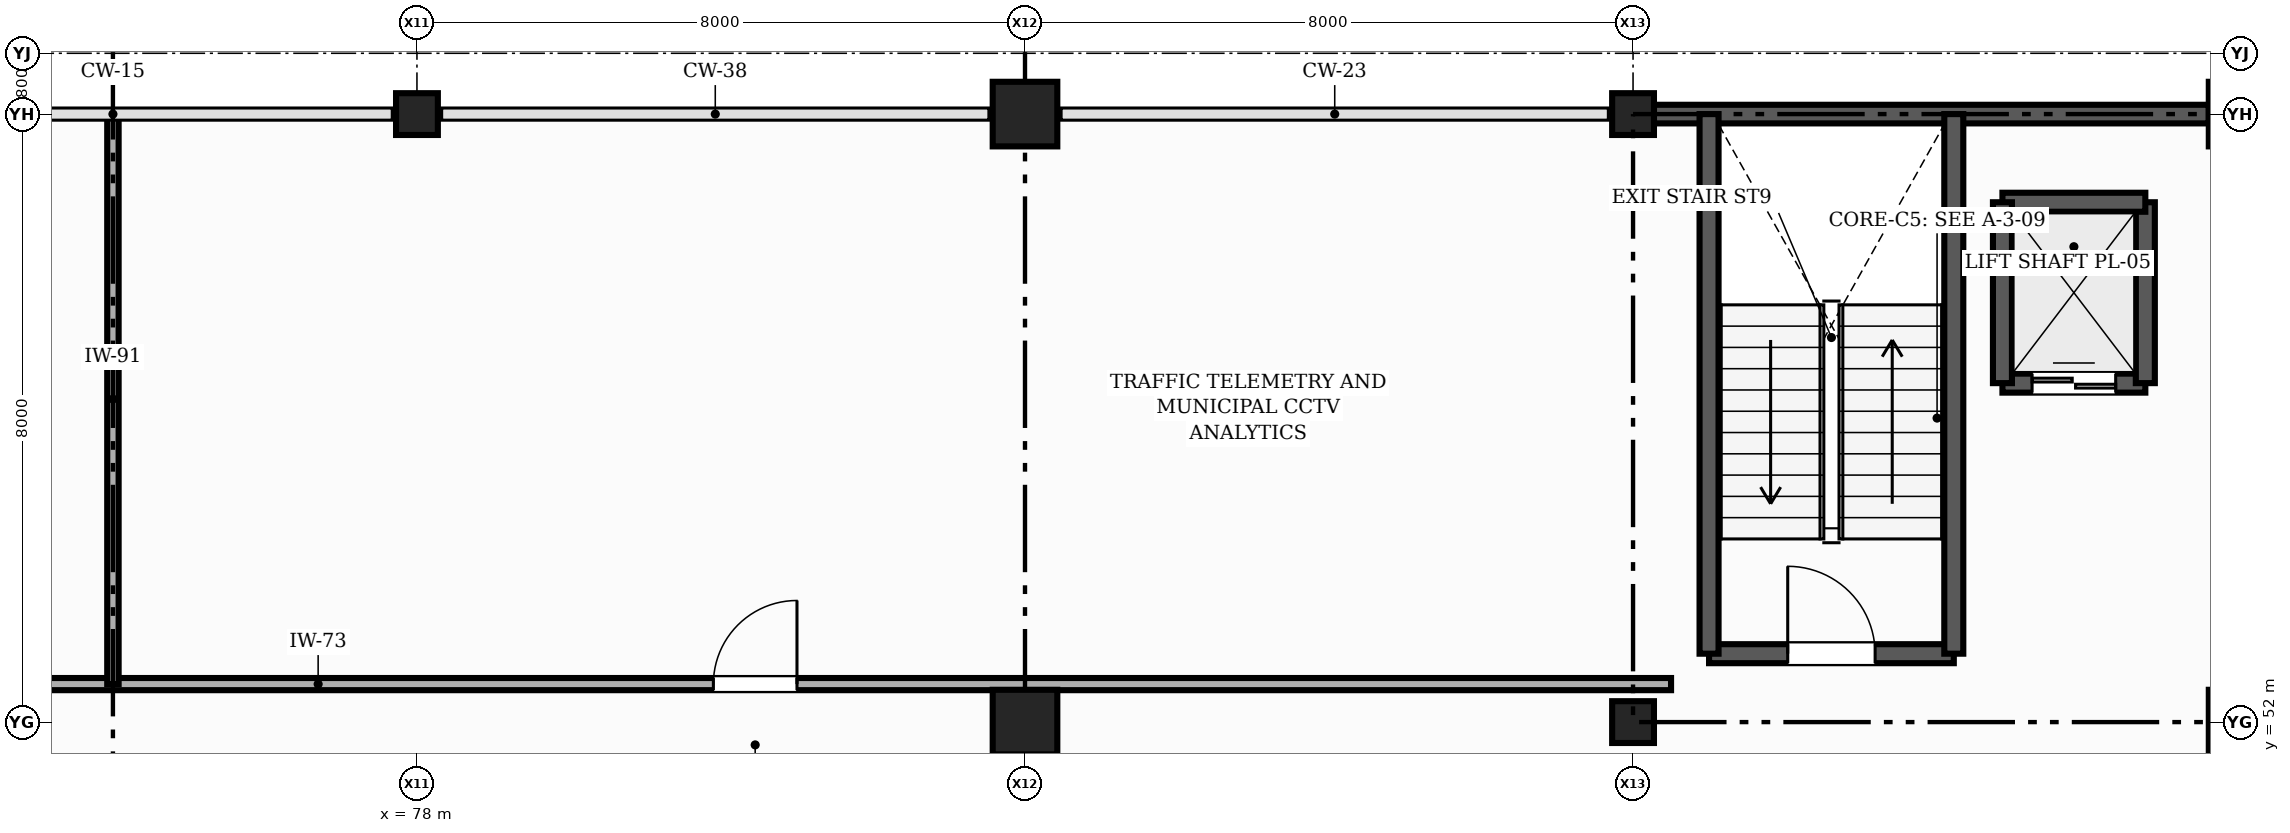
"""IFC4 building model, lengths in metres.
Left out: names, types, materials, properties, quantities, classifications, styles, units other than length and angle.
Written with IfcOpenShell. Run it as: python <this file> out.ifc"""

import sys

from ifc_helpers import new_model, si_unit, direction, frame, frame_2d, origin, origin_2d, place, context, subcontext, project, spatial, rectangle, extrude, element, fill, save


model = new_model("IFC4")
c1 = context("Model", 3, precision=1e-05, world=origin(), true_north=direction((0.0, 1.0)))
c2 = subcontext(c1, "Body", "Model", "MODEL_VIEW")
j1 = project(units=[si_unit("LENGTHUNIT", "METRE"), si_unit("PLANEANGLEUNIT", "RADIAN")], contexts=[c1])
p1 = place(None, origin())
s1 = spatial("IfcSite", under=j1, at=p1, CompositionType="ELEMENT")
p2 = place(p1, origin())
s2 = spatial("IfcBuilding", under=s1, at=p2, CompositionType="ELEMENT")
p3 = place(p2, frame((0.0, 0.0, 9.0)))
s3 = spatial("IfcBuildingStorey", under=s2, at=p3, CompositionType="ELEMENT", Elevation=9.0)
p4 = place(p3, frame((78.0, 60.0, 0.0), z_axis=(0.0, 0.0, 1.0), x_axis=(1.0, 0.0, 0.0)))
e1 = element("IfcColumn", 1, at=p4, inside=s3, PredefinedType="COLUMN", context=c2, shape_type="SweptSolid", body=[
    extrude(rectangle(XDim=0.55, YDim=0.55, at=origin_2d()), origin(), (0.0, 0.0, 1.0), 4.5),
])
for number, where, z_axis, x_axis in (
    (2, (86.0, 52.0, 0.0), (0.0, 0.0, 1.0), (1.0, 0.0, 0.0)),
    (3, (86.0, 60.0, 0.0), (0.0, 0.0, 1.0), (1.0, 0.0, 0.0)),
):
    element("IfcColumn", number, at=place(p3, frame(where, z_axis=z_axis, x_axis=x_axis)), inside=s3, PredefinedType="COLUMN", context=c2, shape_type="SweptSolid", body=[
        extrude(rectangle(XDim=0.85, YDim=0.85, at=origin_2d()), origin(), (0.0, 0.0, 1.0), 4.5),
    ])
for number, where, z_axis, x_axis in (
    (4, (94.0, 52.0, 0.0), (0.0, 0.0, 1.0), (1.0, 0.0, 0.0)),
    (5, (94.0, 60.0, 0.0), (0.0, 0.0, 1.0), (1.0, 0.0, 0.0)),
):
    element("IfcColumn", number, at=place(p3, frame(where, z_axis=z_axis, x_axis=x_axis)), inside=s3, PredefinedType="COLUMN", context=c2, shape_type="SweptSolid", body=[
        extrude(rectangle(XDim=0.55, YDim=0.55, at=origin_2d()), origin(), (0.0, 0.0, 1.0), 4.5),
    ])
for number, where, z_axis, x_axis in (
    (6, (102.0, 52.0, 0.0), (0.0, 0.0, 1.0), (1.0, 0.0, 0.0)),
    (7, (102.0, 60.0, 0.0), (0.0, 0.0, 1.0), (1.0, 0.0, 0.0)),
):
    element("IfcColumn", number, at=place(p3, frame(where, z_axis=z_axis, x_axis=x_axis)), inside=s3, PredefinedType="COLUMN", context=c2, shape_type="SweptSolid", body=[
        extrude(rectangle(XDim=0.85, YDim=0.85, at=origin_2d()), origin(), (0.0, 0.0, 1.0), 4.5),
    ])
p5 = place(p3, frame((101.575, 60.0, 0.0), z_axis=(0.0, 0.0, 1.0), x_axis=(-1.0, 0.0, 0.0)))
e8 = element("IfcWall", 8, at=p5, inside=s3, PredefinedType="SOLIDWALL", context=c2, shape_type="SweptSolid", body=[
    extrude(rectangle(XDim=7.3, YDim=0.245, at=frame_2d((3.65, 0.0))), origin(), (0.0, 0.0, 1.0), 4.22),
])
p6 = place(p3, frame((95.0, 52.9, 0.0), z_axis=(0.0, 0.0, 1.0), x_axis=(1.0, 0.0, 0.0)))
e9 = element("IfcWall", 9, at=p6, inside=s3, PredefinedType="SHEAR", context=c2, shape_type="SweptSolid", body=[
    extrude(rectangle(XDim=3.22, YDim=0.25, at=frame_2d((1.61, 0.0))), origin(), (0.0, 0.0, 1.0), 4.5),
])
p7 = place(p6, frame((1.035, 0.0, 0.0)))
e10 = element("IfcOpeningElement", 10, at=p7, cuts=e9, PredefinedType="OPENING", context=c2, shape_type="SweptSolid", body=[
    extrude(rectangle(XDim=1.15, YDim=2.15, at=frame_2d((0.575, 1.075))), frame((0.0, 0.135, 0.0), z_axis=(0.0, -1.0, 0.0), x_axis=(1.0, 0.0, 0.0)), (0.0, 0.0, 1.0), 0.27),
])
for number, where, z_axis, x_axis in (
    (11, (98.22, 52.9, 0.0), (0.0, 0.0, 1.0), (0.0, 1.0, 0.0)),
    (12, (95.0, 60.0, 0.0), (0.0, 0.0, 1.0), (0.0, -1.0, 0.0)),
):
    element("IfcWall", number, at=place(p3, frame(where, z_axis=z_axis, x_axis=x_axis)), inside=s3, PredefinedType="SHEAR", context=c2, shape_type="SweptSolid", body=[
        extrude(rectangle(XDim=7.1, YDim=0.25, at=frame_2d((3.55, 0.0))), origin(), (0.0, 0.0, 1.0), 4.5),
    ])
p8 = place(p3, frame((98.86, 56.46, 0.0), z_axis=(0.0, 0.0, 1.0), x_axis=(1.0, 0.0, 0.0)))
e13 = element("IfcWall", 13, at=p8, inside=s3, PredefinedType="SHEAR", context=c2, shape_type="SweptSolid", body=[
    extrude(rectangle(XDim=1.88, YDim=0.25, at=frame_2d((0.94, 0.0))), origin(), (0.0, 0.0, 1.0), 4.5),
])
p9 = place(p8, frame((0.39, 0.0, 0.0)))
e14 = element("IfcOpeningElement", 14, at=p9, cuts=e13, PredefinedType="OPENING", context=c2, shape_type="SweptSolid", body=[
    extrude(rectangle(XDim=1.1, YDim=2.2, at=frame_2d((0.55, 1.1))), frame((0.0, 0.135, 0.0), z_axis=(0.0, -1.0, 0.0), x_axis=(1.0, 0.0, 0.0)), (0.0, 0.0, 1.0), 0.27),
])
p10 = place(p3, frame((100.74, 56.46, 0.0), z_axis=(0.0, 0.0, 1.0), x_axis=(0.0, 1.0, 0.0)))
e15 = element("IfcWall", 15, at=p10, inside=s3, PredefinedType="SHEAR", context=c2, shape_type="SweptSolid", body=[
    extrude(rectangle(XDim=2.38, YDim=0.25, at=frame_2d((1.19, 0.0))), origin(), (0.0, 0.0, 1.0), 4.5),
])
p11 = place(p3, frame((100.74, 58.84, 0.0), z_axis=(0.0, 0.0, 1.0), x_axis=(-1.0, 0.0, 0.0)))
e16 = element("IfcWall", 16, at=p11, inside=s3, PredefinedType="SHEAR", context=c2, shape_type="SweptSolid", body=[
    extrude(rectangle(XDim=1.88, YDim=0.25, at=frame_2d((0.94, 0.0))), origin(), (0.0, 0.0, 1.0), 4.5),
])
p12 = place(p3, frame((98.86, 58.84, 0.0), z_axis=(0.0, 0.0, 1.0), x_axis=(0.0, -1.0, 0.0)))
e17 = element("IfcWall", 17, at=p12, inside=s3, PredefinedType="SHEAR", context=c2, shape_type="SweptSolid", body=[
    extrude(rectangle(XDim=2.38, YDim=0.25, at=frame_2d((1.19, 0.0))), origin(), (0.0, 0.0, 1.0), 4.5),
])
p13 = place(p3, frame((58.9, 52.5, 0.0), z_axis=(0.0, 0.0, 1.0), x_axis=(1.0, 0.0, 0.0)))
e18 = element("IfcWall", 18, at=p13, inside=s3, PredefinedType="PARTITIONING", context=c2, shape_type="SweptSolid", body=[
    extrude(rectangle(XDim=35.6, YDim=0.16, at=frame_2d((17.8, 0.0))), origin(), (0.0, 0.0, 1.0), 3.005),
])
p14 = place(p13, frame((5.5, 0.0, 0.0)))
e19 = element("IfcOpeningElement", 19, at=p14, cuts=e18, PredefinedType="OPENING", context=c2, shape_type="SweptSolid", body=[
    extrude(rectangle(XDim=1.1, YDim=2.1, at=frame_2d((0.55, 1.05))), frame((0.0, 0.09, 0.0), z_axis=(0.0, -1.0, 0.0), x_axis=(1.0, 0.0, 0.0)), (0.0, 0.0, 1.0), 0.18),
])
p15 = place(p13, frame((23.0, 0.0, 0.0)))
e20 = element("IfcOpeningElement", 20, at=p15, cuts=e18, PredefinedType="OPENING", context=c2, shape_type="SweptSolid", body=[
    extrude(rectangle(XDim=1.1, YDim=2.1, at=frame_2d((0.55, 1.05))), frame((0.0, 0.09, 0.0), z_axis=(0.0, -1.0, 0.0), x_axis=(1.0, 0.0, 0.0)), (0.0, 0.0, 1.0), 0.18),
])
p16 = place(p3, frame((74.0, 52.5, 0.0), z_axis=(0.0, 0.0, 1.0), x_axis=(0.0, 1.0, 0.0)))
e21 = element("IfcWall", 21, at=p16, inside=s3, PredefinedType="PARTITIONING", context=c2, shape_type="SweptSolid", body=[
    extrude(rectangle(XDim=7.5, YDim=0.15, at=frame_2d((3.75, 0.0))), origin(), (0.0, 0.0, 1.0), 3.185),
])
p17 = place(p7, origin())
e22 = element("IfcDoor", 22, at=p17, inside=s3, OperationType="SINGLE_SWING_LEFT", PredefinedType="DOOR", context=c2, shape_type="SweptSolid", body=[
    extrude(rectangle(XDim=1.15, YDim=2.15, at=frame_2d((0.575, 1.075))), frame((0.0, 0.025, 0.0), z_axis=(0.0, -1.0, 0.0), x_axis=(1.0, 0.0, 0.0)), (0.0, 0.0, 1.0), 0.05),
])
fill(e10, e22)
p18 = place(p9, origin())
e23 = element("IfcDoor", 23, at=p18, inside=s3, OperationType="DOUBLE_DOOR_SLIDING", PredefinedType="DOOR", context=c2, shape_type="SweptSolid", body=[
    extrude(rectangle(XDim=1.1, YDim=2.2, at=frame_2d((0.55, 1.1))), frame((0.0, 0.025, 0.0), z_axis=(0.0, -1.0, 0.0), x_axis=(1.0, 0.0, 0.0)), (0.0, 0.0, 1.0), 0.05),
])
fill(e14, e23)
p19 = place(p15, origin())
e24 = element("IfcDoor", 24, at=p19, inside=s3, OperationType="SINGLE_SWING_RIGHT", PredefinedType="DOOR", context=c2, shape_type="SweptSolid", body=[
    extrude(rectangle(XDim=1.1, YDim=2.1, at=frame_2d((0.55, 1.05))), frame((0.0, 0.025, 0.0), z_axis=(0.0, -1.0, 0.0), x_axis=(1.0, 0.0, 0.0)), (0.0, 0.0, 1.0), 0.05),
])
fill(e20, e24)
save(model, sys.argv[1])
